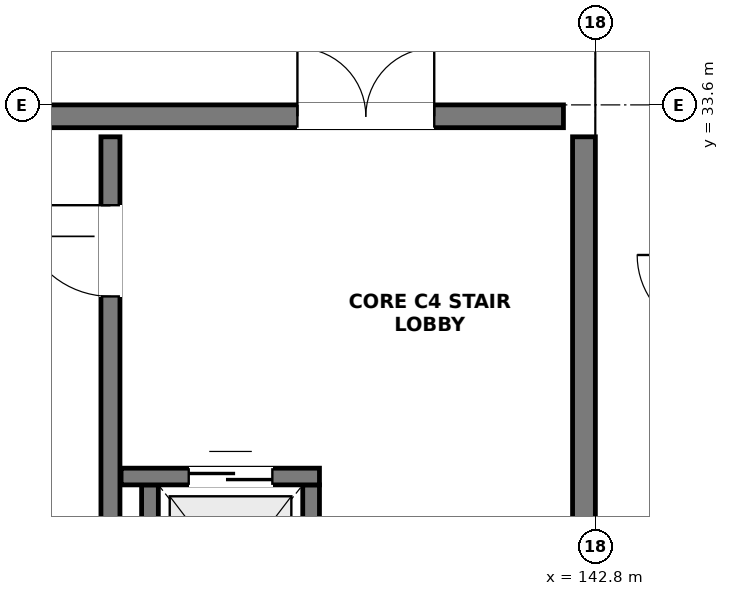
"""IFC4 building model, lengths in metres.
Left out: names, types, materials, properties, quantities, classifications, styles, units other than length and angle.
Written with IfcOpenShell. Run it as: python <this file> out.ifc"""

import sys

from ifc_helpers import new_model, si_unit, direction, frame, frame_2d, origin, place, context, subcontext, project, spatial, rectangle, extrude, element, fill, save


model = new_model("IFC4")
c1 = context("Model", 3, precision=1e-05, world=origin(), true_north=direction((0.0, 1.0)))
c2 = subcontext(c1, "Body", "Model", "MODEL_VIEW")
j1 = project(units=[si_unit("LENGTHUNIT", "METRE"), si_unit("PLANEANGLEUNIT", "RADIAN")], contexts=[c1])
p1 = place(None, origin())
s1 = spatial("IfcSite", under=j1, at=p1, CompositionType="ELEMENT")
p2 = place(p1, origin())
s2 = spatial("IfcBuilding", under=s1, at=p2, CompositionType="ELEMENT")
p3 = place(p2, frame((0.0, 0.0, 14.4)))
s3 = spatial("IfcBuildingStorey", under=s2, at=p3, CompositionType="ELEMENT", Elevation=14.4)
p4 = place(p3, frame((126.45, 33.45, 0.0), z_axis=(0.0, 0.0, 1.0), x_axis=(1.0, 0.0, 0.0)))
e1 = element("IfcWall", 1, at=p4, inside=s3, PredefinedType="SHEAR", context=c2, shape_type="SweptSolid", body=[
    extrude(rectangle(XDim=15.93, YDim=0.3, at=frame_2d((7.965, 0.0))), origin(), (0.0, 0.0, 1.0), 3.62),
])
p5 = place(p4, frame((12.43, 0.0, 0.0)))
e2 = element("IfcOpeningElement", 2, at=p5, cuts=e1, PredefinedType="OPENING", context=c2, shape_type="SweptSolid", body=[
    extrude(rectangle(XDim=1.8, YDim=2.2, at=frame_2d((0.9, 1.1))), frame((0.0, 0.162, 0.0), z_axis=(0.0, -1.0, 0.0), x_axis=(1.0, 0.0, 0.0)), (0.0, 0.0, 1.0), 0.324),
])
p6 = place(p3, frame((142.65, 25.62, 0.0), z_axis=(0.0, 0.0, 1.0), x_axis=(0.0, 1.0, 0.0)))
e3 = element("IfcWall", 3, at=p6, inside=s3, PredefinedType="SHEAR", context=c2, shape_type="SweptSolid", body=[
    extrude(rectangle(XDim=7.56, YDim=0.3, at=frame_2d((3.78, 0.0))), origin(), (0.0, 0.0, 1.0), 3.62),
])
p7 = place(p3, frame((136.42, 25.62, 0.0), z_axis=(0.0, 0.0, 1.0), x_axis=(0.0, 1.0, 0.0)))
e4 = element("IfcWall", 4, at=p7, inside=s3, PredefinedType="SHEAR", context=c2, shape_type="SweptSolid", body=[
    extrude(rectangle(XDim=7.56, YDim=0.25, at=frame_2d((3.78, 0.0))), origin(), (0.0, 0.0, 1.0), 3.62),
])
p8 = place(p7, frame((5.46, 0.0, 0.0)))
e5 = element("IfcOpeningElement", 5, at=p8, cuts=e4, PredefinedType="OPENING", context=c2, shape_type="SweptSolid", body=[
    extrude(rectangle(XDim=1.2, YDim=2.2, at=frame_2d((0.6, 1.1))), frame((0.0, 0.137, 0.0), z_axis=(0.0, -1.0, 0.0), x_axis=(1.0, 0.0, 0.0)), (0.0, 0.0, 1.0), 0.274),
])
for number, where, z_axis, x_axis in (
    (6, (136.94, 26.2, 0.0), (0.0, 0.0, 1.0), (0.0, 1.0, 0.0)),
    (7, (139.06, 26.2, 0.0), (0.0, 0.0, 1.0), (0.0, 1.0, 0.0)),
):
    element("IfcWall", number, at=place(p3, frame(where, z_axis=z_axis, x_axis=x_axis)), inside=s3, PredefinedType="SOLIDWALL", context=c2, shape_type="SweptSolid", body=[
        extrude(rectangle(XDim=2.4, YDim=0.22, at=frame_2d((1.2, 0.0))), origin(), (0.0, 0.0, 1.0), 3.62),
    ])
p9 = place(p3, frame((136.56, 28.71, 0.0), z_axis=(0.0, 0.0, 1.0), x_axis=(1.0, 0.0, 0.0)))
e8 = element("IfcWall", 8, at=p9, inside=s3, PredefinedType="SOLIDWALL", context=c2, shape_type="SweptSolid", body=[
    extrude(rectangle(XDim=2.61, YDim=0.22, at=frame_2d((1.305, 0.0))), origin(), (0.0, 0.0, 1.0), 3.62),
])
p10 = place(p9, frame((0.89, 0.0, 0.0)))
e9 = element("IfcOpeningElement", 9, at=p10, cuts=e8, PredefinedType="OPENING", context=c2, shape_type="SweptSolid", body=[
    extrude(rectangle(XDim=1.1, YDim=2.15, at=frame_2d((0.55, 1.075))), frame((0.0, 0.122, 0.0), z_axis=(0.0, -1.0, 0.0), x_axis=(1.0, 0.0, 0.0)), (0.0, 0.0, 1.0), 0.244),
])
p11 = place(p5, origin())
e10 = element("IfcDoor", 10, at=p11, inside=s3, OperationType="DOUBLE_DOOR_SINGLE_SWING", PredefinedType="DOOR", context=c2, shape_type="SweptSolid", body=[
    extrude(rectangle(XDim=1.8, YDim=2.2, at=frame_2d((0.9, 1.1))), frame((0.0, 0.025, 0.0), z_axis=(0.0, -1.0, 0.0), x_axis=(1.0, 0.0, 0.0)), (0.0, 0.0, 1.0), 0.05),
])
fill(e2, e10)
p12 = place(p8, origin())
e11 = element("IfcDoor", 11, at=p12, inside=s3, OperationType="SINGLE_SWING_RIGHT", PredefinedType="DOOR", context=c2, shape_type="SweptSolid", body=[
    extrude(rectangle(XDim=1.2, YDim=2.2, at=frame_2d((0.6, 1.1))), frame((0.0, 0.025, 0.0), z_axis=(0.0, -1.0, 0.0), x_axis=(1.0, 0.0, 0.0)), (0.0, 0.0, 1.0), 0.05),
])
fill(e5, e11)
p13 = place(p10, origin())
e12 = element("IfcDoor", 12, at=p13, inside=s3, OperationType="DOUBLE_DOOR_SLIDING", PredefinedType="DOOR", context=c2, shape_type="SweptSolid", body=[
    extrude(rectangle(XDim=1.1, YDim=2.15, at=frame_2d((0.55, 1.075))), frame((0.0, 0.025, 0.0), z_axis=(0.0, -1.0, 0.0), x_axis=(1.0, 0.0, 0.0)), (0.0, 0.0, 1.0), 0.05),
])
fill(e9, e12)
save(model, sys.argv[1])
